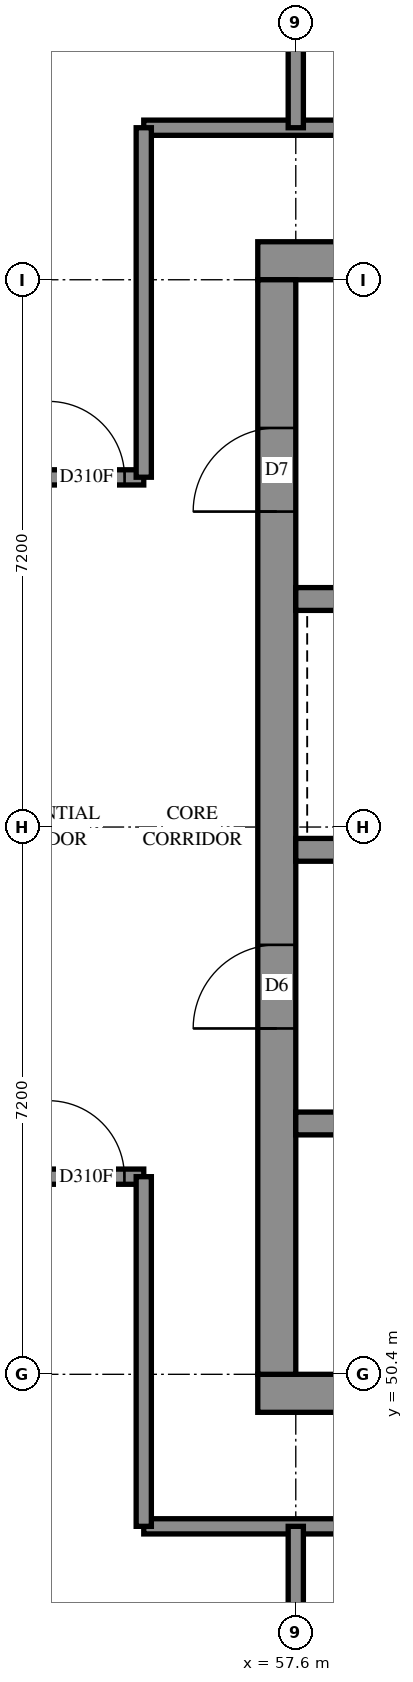
"""IFC4 building model, lengths in metres.
Left out: names, types, materials, properties, quantities, classifications, styles, units other than length and angle.
Written with IfcOpenShell. Run it as: python <this file> out.ifc"""

import sys

from ifc_helpers import new_model, si_unit, direction, frame, frame_2d, origin, place, context, subcontext, project, spatial, rectangle, extrude, element, fill, save


model = new_model("IFC4")
c1 = context("Model", 3, precision=1e-05, world=origin(), true_north=direction((0.0, 1.0)))
c2 = subcontext(c1, "Body", "Model", "MODEL_VIEW")
j1 = project(units=[si_unit("LENGTHUNIT", "METRE"), si_unit("PLANEANGLEUNIT", "RADIAN")], contexts=[c1])
p1 = place(None, origin())
s1 = spatial("IfcSite", under=j1, at=p1, CompositionType="ELEMENT")
p2 = place(p1, origin())
s2 = spatial("IfcBuilding", under=s1, at=p2, CompositionType="ELEMENT")
p3 = place(p2, frame((0.0, 0.0, 193.0)))
s3 = spatial("IfcBuildingStorey", under=s2, at=p3, CompositionType="ELEMENT", Elevation=193.0)
p4 = place(p3, frame((57.1, 50.15, -0.3), z_axis=(0.0, 0.0, 1.0), x_axis=(1.0, 0.0, 0.0)))
e1 = element("IfcWall", 1, at=p4, inside=s3, PredefinedType="SHEAR", context=c2, shape_type="SweptSolid", body=[
    extrude(rectangle(XDim=15.4, YDim=0.5, at=frame_2d((7.7, 0.0))), origin(), (0.0, 0.0, 1.0), 2.7),
])
p5 = place(p3, frame((57.1, 65.05, -0.3), z_axis=(0.0, 0.0, 1.0), x_axis=(1.0, 0.0, 0.0)))
e2 = element("IfcWall", 2, at=p5, inside=s3, PredefinedType="SHEAR", context=c2, shape_type="SweptSolid", body=[
    extrude(rectangle(XDim=15.4, YDim=0.5, at=frame_2d((7.7, 0.0))), origin(), (0.0, 0.0, 1.0), 2.7),
])
p6 = place(p5, frame((10.5, 0.0, 0.3)))
e3 = element("IfcOpeningElement", 3, at=p6, cuts=e2, PredefinedType="OPENING", context=c2, shape_type="SweptSolid", body=[
    extrude(rectangle(XDim=0.8, YDim=2.1, at=frame_2d((0.4, 1.05))), frame((0.0, 0.26, 0.0), z_axis=(0.0, -1.0, 0.0), x_axis=(1.0, 0.0, 0.0)), (0.0, 0.0, 1.0), 0.52),
])
p7 = place(p3, frame((57.35, 50.4, -0.3), z_axis=(0.0, 0.0, 1.0), x_axis=(0.0, 1.0, 0.0)))
e4 = element("IfcWall", 4, at=p7, inside=s3, PredefinedType="SHEAR", context=c2, shape_type="SweptSolid", body=[
    extrude(rectangle(XDim=14.4, YDim=0.5, at=frame_2d((7.2, 0.0))), origin(), (0.0, 0.0, 1.0), 2.7),
])
p8 = place(p7, frame((4.55, 0.0, 0.3)))
e5 = element("IfcOpeningElement", 5, at=p8, cuts=e4, PredefinedType="OPENING", context=c2, shape_type="SweptSolid", body=[
    extrude(rectangle(XDim=1.1, YDim=2.1, at=frame_2d((0.55, 1.05))), frame((0.0, 0.26, 0.0), z_axis=(0.0, -1.0, 0.0), x_axis=(1.0, 0.0, 0.0)), (0.0, 0.0, 1.0), 0.52),
])
p9 = place(p7, frame((11.35, 0.0, 0.3)))
e6 = element("IfcOpeningElement", 6, at=p9, cuts=e4, PredefinedType="OPENING", context=c2, shape_type="SweptSolid", body=[
    extrude(rectangle(XDim=1.1, YDim=2.1, at=frame_2d((0.55, 1.05))), frame((0.0, 0.26, 0.0), z_axis=(0.0, -1.0, 0.0), x_axis=(1.0, 0.0, 0.0)), (0.0, 0.0, 1.0), 0.52),
])
p10 = place(p3, frame((57.6, 53.7, 0.0), z_axis=(0.0, 0.0, 1.0), x_axis=(1.0, 0.0, 0.0)))
e7 = element("IfcWall", 7, at=p10, inside=s3, PredefinedType="SOLIDWALL", context=c2, shape_type="SweptSolid", body=[
    extrude(rectangle(XDim=14.4, YDim=0.3, at=frame_2d((7.2, 0.0))), origin(), (0.0, 0.0, 1.0), 3.1),
])
p11 = place(p10, frame((1.35, 0.0, 0.0)))
e8 = element("IfcOpeningElement", 8, at=p11, cuts=e7, PredefinedType="OPENING", context=c2, shape_type="SweptSolid", body=[
    extrude(rectangle(XDim=0.9, YDim=2.1, at=frame_2d((0.45, 1.05))), frame((0.0, 0.16, 0.0), z_axis=(0.0, -1.0, 0.0), x_axis=(1.0, 0.0, 0.0)), (0.0, 0.0, 1.0), 0.32),
])
p12 = place(p10, frame((4.95, 0.0, 0.0)))
e9 = element("IfcOpeningElement", 9, at=p12, cuts=e7, PredefinedType="OPENING", context=c2, shape_type="SweptSolid", body=[
    extrude(rectangle(XDim=0.9, YDim=2.1, at=frame_2d((0.45, 1.05))), frame((0.0, 0.16, 0.0), z_axis=(0.0, -1.0, 0.0), x_axis=(1.0, 0.0, 0.0)), (0.0, 0.0, 1.0), 0.32),
])
p13 = place(p10, frame((8.55, 0.0, 0.0)))
e10 = element("IfcOpeningElement", 10, at=p13, cuts=e7, PredefinedType="OPENING", context=c2, shape_type="SweptSolid", body=[
    extrude(rectangle(XDim=0.9, YDim=2.1, at=frame_2d((0.45, 1.05))), frame((0.0, 0.16, 0.0), z_axis=(0.0, -1.0, 0.0), x_axis=(1.0, 0.0, 0.0)), (0.0, 0.0, 1.0), 0.32),
])
p14 = place(p10, frame((12.05, 0.0, 0.0)))
e11 = element("IfcOpeningElement", 11, at=p14, cuts=e7, PredefinedType="OPENING", context=c2, shape_type="SweptSolid", body=[
    extrude(rectangle(XDim=1.1, YDim=2.1, at=frame_2d((0.55, 1.05))), frame((0.0, 0.16, 0.0), z_axis=(0.0, -1.0, 0.0), x_axis=(1.0, 0.0, 0.0)), (0.0, 0.0, 1.0), 0.32),
])
p15 = place(p3, frame((57.6, 57.3, 0.0), z_axis=(0.0, 0.0, 1.0), x_axis=(1.0, 0.0, 0.0)))
e12 = element("IfcWall", 12, at=p15, inside=s3, PredefinedType="SOLIDWALL", context=c2, shape_type="SweptSolid", body=[
    extrude(rectangle(XDim=14.4, YDim=0.3, at=frame_2d((7.2, 0.0))), origin(), (0.0, 0.0, 1.0), 3.1),
])
p16 = place(p15, frame((1.25, 0.0, 0.0)))
e13 = element("IfcOpeningElement", 13, at=p16, cuts=e12, PredefinedType="OPENING", context=c2, shape_type="SweptSolid", body=[
    extrude(rectangle(XDim=1.1, YDim=2.1, at=frame_2d((0.55, 1.05))), frame((0.0, 0.16, 0.0), z_axis=(0.0, -1.0, 0.0), x_axis=(1.0, 0.0, 0.0)), (0.0, 0.0, 1.0), 0.32),
])
p17 = place(p15, frame((4.85, 0.0, 0.0)))
e14 = element("IfcOpeningElement", 14, at=p17, cuts=e12, PredefinedType="OPENING", context=c2, shape_type="SweptSolid", body=[
    extrude(rectangle(XDim=1.1, YDim=2.1, at=frame_2d((0.55, 1.05))), frame((0.0, 0.16, 0.0), z_axis=(0.0, -1.0, 0.0), x_axis=(1.0, 0.0, 0.0)), (0.0, 0.0, 1.0), 0.32),
])
p18 = place(p15, frame((8.45, 0.0, 0.0)))
e15 = element("IfcOpeningElement", 15, at=p18, cuts=e12, PredefinedType="OPENING", context=c2, shape_type="SweptSolid", body=[
    extrude(rectangle(XDim=1.1, YDim=2.1, at=frame_2d((0.55, 1.05))), frame((0.0, 0.16, 0.0), z_axis=(0.0, -1.0, 0.0), x_axis=(1.0, 0.0, 0.0)), (0.0, 0.0, 1.0), 0.32),
])
p19 = place(p15, frame((12.05, 0.0, 0.0)))
e16 = element("IfcOpeningElement", 16, at=p19, cuts=e12, PredefinedType="OPENING", context=c2, shape_type="SweptSolid", body=[
    extrude(rectangle(XDim=1.1, YDim=2.1, at=frame_2d((0.55, 1.05))), frame((0.0, 0.16, 0.0), z_axis=(0.0, -1.0, 0.0), x_axis=(1.0, 0.0, 0.0)), (0.0, 0.0, 1.0), 0.32),
])
p20 = place(p3, frame((57.6, 60.6, 0.0), z_axis=(0.0, 0.0, 1.0), x_axis=(1.0, 0.0, 0.0)))
e17 = element("IfcWall", 17, at=p20, inside=s3, PredefinedType="SOLIDWALL", context=c2, shape_type="SweptSolid", body=[
    extrude(rectangle(XDim=7.2, YDim=0.3, at=frame_2d((3.6, 0.0))), origin(), (0.0, 0.0, 1.0), 3.1),
])
p21 = place(p3, frame((55.6, 48.4, 0.0), z_axis=(0.0, 0.0, 1.0), x_axis=(1.0, 0.0, 0.0)))
e18 = element("IfcWall", 18, at=p21, inside=s3, PredefinedType="PARTITIONING", context=c2, shape_type="SweptSolid", body=[
    extrude(rectangle(XDim=18.4, YDim=0.2, at=frame_2d((9.2, 0.0))), origin(), (0.0, 0.0, 1.0), 3.1),
])
p22 = place(p21, frame((5.862, 0.0, 0.0)))
e19 = element("IfcOpeningElement", 19, at=p22, cuts=e18, PredefinedType="OPENING", context=c2, shape_type="SweptSolid", body=[
    extrude(rectangle(XDim=1.0, YDim=2.1, at=frame_2d((0.5, 1.05))), frame((0.0, 0.11, 0.0), z_axis=(0.0, -1.0, 0.0), x_axis=(1.0, 0.0, 0.0)), (0.0, 0.0, 1.0), 0.22),
])
p23 = place(p21, frame((11.5, 0.0, 0.0)))
e20 = element("IfcOpeningElement", 20, at=p23, cuts=e18, PredefinedType="OPENING", context=c2, shape_type="SweptSolid", body=[
    extrude(rectangle(XDim=0.9, YDim=2.1, at=frame_2d((0.45, 1.05))), frame((0.0, 0.11, 0.0), z_axis=(0.0, -1.0, 0.0), x_axis=(1.0, 0.0, 0.0)), (0.0, 0.0, 1.0), 0.22),
])
p24 = place(p21, frame((13.2, 0.0, 0.0)))
e21 = element("IfcOpeningElement", 21, at=p24, cuts=e18, PredefinedType="OPENING", context=c2, shape_type="SweptSolid", body=[
    extrude(rectangle(XDim=0.9, YDim=2.1, at=frame_2d((0.45, 1.05))), frame((0.0, 0.11, 0.0), z_axis=(0.0, -1.0, 0.0), x_axis=(1.0, 0.0, 0.0)), (0.0, 0.0, 1.0), 0.22),
])
p25 = place(p3, frame((55.6, 66.8, 0.0), z_axis=(0.0, 0.0, 1.0), x_axis=(1.0, 0.0, 0.0)))
e22 = element("IfcWall", 22, at=p25, inside=s3, PredefinedType="PARTITIONING", context=c2, shape_type="SweptSolid", body=[
    extrude(rectangle(XDim=18.4, YDim=0.2, at=frame_2d((9.2, 0.0))), origin(), (0.0, 0.0, 1.0), 3.1),
])
p26 = place(p25, frame((5.886, 0.0, 0.0)))
e23 = element("IfcOpeningElement", 23, at=p26, cuts=e22, PredefinedType="OPENING", context=c2, shape_type="SweptSolid", body=[
    extrude(rectangle(XDim=1.0, YDim=2.1, at=frame_2d((0.5, 1.05))), frame((0.0, 0.11, 0.0), z_axis=(0.0, -1.0, 0.0), x_axis=(1.0, 0.0, 0.0)), (0.0, 0.0, 1.0), 0.22),
])
p27 = place(p25, frame((13.389, 0.0, 0.0)))
e24 = element("IfcOpeningElement", 24, at=p27, cuts=e22, PredefinedType="OPENING", context=c2, shape_type="SweptSolid", body=[
    extrude(rectangle(XDim=1.0, YDim=2.1, at=frame_2d((0.5, 1.05))), frame((0.0, 0.11, 0.0), z_axis=(0.0, -1.0, 0.0), x_axis=(1.0, 0.0, 0.0)), (0.0, 0.0, 1.0), 0.22),
])
p28 = place(p3, frame((40.602, 62.2, 0.0), z_axis=(0.0, 0.0, 1.0), x_axis=(1.0, 0.0, 0.0)))
e25 = element("IfcWall", 25, at=p28, inside=s3, PredefinedType="PARTITIONING", context=c2, shape_type="SweptSolid", body=[
    extrude(rectangle(XDim=14.998, YDim=0.2, at=frame_2d((7.499, 0.0))), origin(), (0.0, 0.0, 1.0), 3.1),
])
p29 = place(p28, frame((1.306, 0.0, 0.0)))
e26 = element("IfcOpeningElement", 26, at=p29, cuts=e25, PredefinedType="OPENING", context=c2, shape_type="SweptSolid", body=[
    extrude(rectangle(XDim=0.9, YDim=2.1, at=frame_2d((0.45, 1.05))), frame((0.0, 0.11, 0.0), z_axis=(0.0, -1.0, 0.0), x_axis=(1.0, 0.0, 0.0)), (0.0, 0.0, 1.0), 0.22),
])
p30 = place(p28, frame((8.548, 0.0, 0.0)))
e27 = element("IfcOpeningElement", 27, at=p30, cuts=e25, PredefinedType="OPENING", context=c2, shape_type="SweptSolid", body=[
    extrude(rectangle(XDim=0.9, YDim=2.1, at=frame_2d((0.45, 1.05))), frame((0.0, 0.11, 0.0), z_axis=(0.0, -1.0, 0.0), x_axis=(1.0, 0.0, 0.0)), (0.0, 0.0, 1.0), 0.22),
])
p31 = place(p28, frame((10.198, 0.0, 0.0)))
e28 = element("IfcOpeningElement", 28, at=p31, cuts=e25, PredefinedType="OPENING", context=c2, shape_type="SweptSolid", body=[
    extrude(rectangle(XDim=0.9, YDim=2.1, at=frame_2d((0.45, 1.05))), frame((0.0, 0.11, 0.0), z_axis=(0.0, -1.0, 0.0), x_axis=(1.0, 0.0, 0.0)), (0.0, 0.0, 1.0), 0.22),
])
p32 = place(p28, frame((13.746, 0.0, 0.0)))
e29 = element("IfcOpeningElement", 29, at=p32, cuts=e25, PredefinedType="OPENING", context=c2, shape_type="SweptSolid", body=[
    extrude(rectangle(XDim=1.0, YDim=2.1, at=frame_2d((0.5, 1.05))), frame((0.0, 0.11, 0.0), z_axis=(0.0, -1.0, 0.0), x_axis=(1.0, 0.0, 0.0)), (0.0, 0.0, 1.0), 0.22),
])
p33 = place(p3, frame((50.4, 53.0, 0.0), z_axis=(0.0, 0.0, 1.0), x_axis=(1.0, 0.0, 0.0)))
e30 = element("IfcWall", 30, at=p33, inside=s3, PredefinedType="PARTITIONING", context=c2, shape_type="SweptSolid", body=[
    extrude(rectangle(XDim=5.2, YDim=0.2, at=frame_2d((2.6, 0.0))), origin(), (0.0, 0.0, 1.0), 3.1),
])
p34 = place(p33, frame((0.4, 0.0, 0.0)))
e31 = element("IfcOpeningElement", 31, at=p34, cuts=e30, PredefinedType="OPENING", context=c2, shape_type="SweptSolid", body=[
    extrude(rectangle(XDim=0.9, YDim=2.1, at=frame_2d((0.45, 1.05))), frame((0.0, 0.11, 0.0), z_axis=(0.0, -1.0, 0.0), x_axis=(1.0, 0.0, 0.0)), (0.0, 0.0, 1.0), 0.22),
])
p35 = place(p33, frame((3.946, 0.0, 0.0)))
e32 = element("IfcOpeningElement", 32, at=p35, cuts=e30, PredefinedType="OPENING", context=c2, shape_type="SweptSolid", body=[
    extrude(rectangle(XDim=1.0, YDim=2.1, at=frame_2d((0.5, 1.05))), frame((0.0, 0.11, 0.0), z_axis=(0.0, -1.0, 0.0), x_axis=(1.0, 0.0, 0.0)), (0.0, 0.0, 1.0), 0.22),
])
for number, where, z_axis, x_axis in (
    (33, (57.6, 43.6, 0.0), (0.0, 0.0, 1.0), (0.0, 1.0, 0.0)),
    (34, (57.6, 66.8, 0.0), (0.0, 0.0, 1.0), (0.0, 1.0, 0.0)),
):
    element("IfcWall", number, at=place(p3, frame(where, z_axis=z_axis, x_axis=x_axis)), inside=s3, PredefinedType="PARTITIONING", context=c2, shape_type="SweptSolid", body=[
        extrude(rectangle(XDim=4.8, YDim=0.2, at=frame_2d((2.4, 0.0))), origin(), (0.0, 0.0, 1.0), 3.1),
    ])
p36 = place(p3, frame((55.6, 48.4, 0.0), z_axis=(0.0, 0.0, 1.0), x_axis=(0.0, 1.0, 0.0)))
e35 = element("IfcWall", 35, at=p36, inside=s3, PredefinedType="PARTITIONING", context=c2, shape_type="SweptSolid", body=[
    extrude(rectangle(XDim=4.6, YDim=0.2, at=frame_2d((2.3, 0.0))), origin(), (0.0, 0.0, 1.0), 3.1),
])
p37 = place(p3, frame((55.6, 62.202, 0.0), z_axis=(0.0, 0.0, 1.0), x_axis=(0.0, 1.0, 0.0)))
e36 = element("IfcWall", 36, at=p37, inside=s3, PredefinedType="PARTITIONING", context=c2, shape_type="SweptSolid", body=[
    extrude(rectangle(XDim=4.598, YDim=0.2, at=frame_2d((2.299, 0.0))), origin(), (0.0, 0.0, 1.0), 3.1),
])
p38 = place(p8, origin())
e37 = element("IfcDoor", 37, at=p38, inside=s3, OperationType="DOUBLE_DOOR_SINGLE_SWING", PredefinedType="DOOR", context=c2, shape_type="SweptSolid", body=[
    extrude(rectangle(XDim=1.1, YDim=2.1, at=frame_2d((0.55, 1.05))), frame((0.0, 0.025, 0.0), z_axis=(0.0, -1.0, 0.0), x_axis=(1.0, 0.0, 0.0)), (0.0, 0.0, 1.0), 0.05),
])
fill(e5, e37)
p39 = place(p9, origin())
e38 = element("IfcDoor", 38, at=p39, inside=s3, OperationType="SINGLE_SWING_LEFT", PredefinedType="DOOR", context=c2, shape_type="SweptSolid", body=[
    extrude(rectangle(XDim=1.1, YDim=2.1, at=frame_2d((0.55, 1.05))), frame((0.0, 0.025, 0.0), z_axis=(0.0, -1.0, 0.0), x_axis=(1.0, 0.0, 0.0)), (0.0, 0.0, 1.0), 0.05),
])
fill(e6, e38)
p40 = place(p32, origin())
e39 = element("IfcDoor", 39, at=p40, inside=s3, OperationType="SINGLE_SWING_LEFT", PredefinedType="DOOR", context=c2, shape_type="SweptSolid", body=[
    extrude(rectangle(XDim=1.0, YDim=2.1, at=frame_2d((0.5, 1.05))), frame((0.0, 0.025, 0.0), z_axis=(0.0, -1.0, 0.0), x_axis=(1.0, 0.0, 0.0)), (0.0, 0.0, 1.0), 0.05),
])
fill(e29, e39)
p41 = place(p35, origin())
e40 = element("IfcDoor", 40, at=p41, inside=s3, OperationType="SINGLE_SWING_RIGHT", PredefinedType="DOOR", context=c2, shape_type="SweptSolid", body=[
    extrude(rectangle(XDim=1.0, YDim=2.1, at=frame_2d((0.5, 1.05))), frame((0.0, 0.025, 0.0), z_axis=(0.0, -1.0, 0.0), x_axis=(1.0, 0.0, 0.0)), (0.0, 0.0, 1.0), 0.05),
])
fill(e32, e40)
save(model, sys.argv[1])
